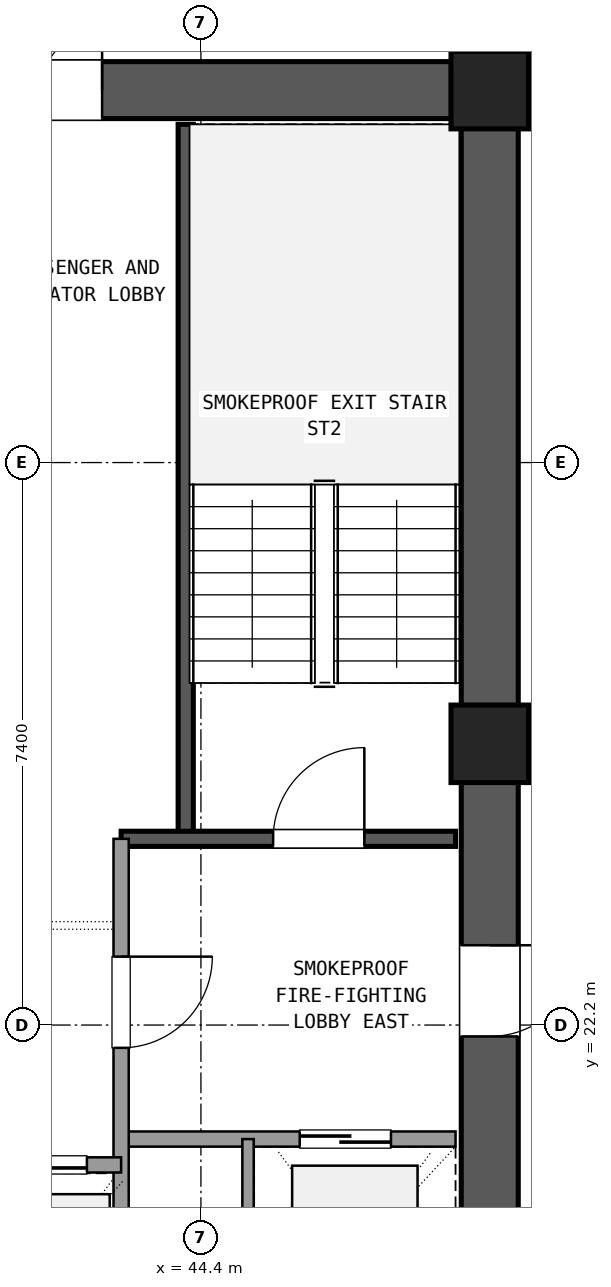
"""IFC4 building model, lengths in metres.
Left out: names, types, materials, properties, quantities, classifications, styles, units other than length and angle.
Written with IfcOpenShell. Run it as: python <this file> out.ifc"""

import sys

from ifc_helpers import new_model, si_unit, direction, frame, frame_2d, origin, origin_2d, place, context, subcontext, project, spatial, rectangle, extrude, element, fill, save


model = new_model("IFC4")
c1 = context("Model", 3, precision=1e-05, world=origin(), true_north=direction((0.0, 1.0)))
c2 = subcontext(c1, "Body", "Model", "MODEL_VIEW")
j1 = project(units=[si_unit("LENGTHUNIT", "METRE"), si_unit("PLANEANGLEUNIT", "RADIAN")], contexts=[c1])
p1 = place(None, origin())
s1 = spatial("IfcSite", under=j1, at=p1, CompositionType="ELEMENT")
p2 = place(p1, origin())
s2 = spatial("IfcBuilding", under=s1, at=p2, CompositionType="ELEMENT")
p3 = place(p2, frame((0.0, 0.0, 99.18)))
s3 = spatial("IfcBuildingStorey", under=s2, at=p3, CompositionType="ELEMENT", Elevation=99.18)
for number, where, z_axis, x_axis in (
    (1, (48.2, 25.9, 0.0), (0.0, 0.0, 1.0), (1.0, 0.0, 0.0)),
    (2, (48.2, 34.5, 0.0), (0.0, 0.0, 1.0), (1.0, 0.0, 0.0)),
):
    element("IfcColumn", number, at=place(p3, frame(where, z_axis=z_axis, x_axis=x_axis)), inside=s3, PredefinedType="COLUMN", context=c2, shape_type="SweptSolid", body=[
        extrude(rectangle(XDim=1.02, YDim=1.02, at=origin_2d()), origin(), (0.0, 0.0, 1.0), 3.6),
    ])
p4 = place(p3, frame((48.2, 17.805, 0.0), z_axis=(0.0, 0.0, 1.0), x_axis=(0.0, 1.0, 0.0)))
e3 = element("IfcWall", 3, at=p4, inside=s3, PredefinedType="SHEAR", context=c2, shape_type="SweptSolid", body=[
    extrude(rectangle(XDim=7.59, YDim=0.75, at=frame_2d((3.795, 0.0))), origin(), (0.0, 0.0, 1.0), 3.32),
])
p5 = place(p4, frame((4.245, 0.0, 0.0)))
e4 = element("IfcOpeningElement", 4, at=p5, cuts=e3, PredefinedType="OPENING", context=c2, shape_type="SweptSolid", body=[
    extrude(rectangle(XDim=1.2, YDim=2.15, at=frame_2d((0.6, 1.075))), frame((0.0, 0.385, 0.0), z_axis=(0.0, -1.0, 0.0), x_axis=(1.0, 0.0, 0.0)), (0.0, 0.0, 1.0), 0.77),
])
p6 = place(p3, frame((48.2, 26.405, 0.0), z_axis=(0.0, 0.0, 1.0), x_axis=(0.0, 1.0, 0.0)))
e5 = element("IfcWall", 5, at=p6, inside=s3, PredefinedType="SHEAR", context=c2, shape_type="SweptSolid", body=[
    extrude(rectangle(XDim=7.59, YDim=0.75, at=frame_2d((3.795, 0.0))), origin(), (0.0, 0.0, 1.0), 3.32),
])
p7 = place(p3, frame((47.695, 34.5, 0.0), z_axis=(0.0, 0.0, 1.0), x_axis=(-1.0, 0.0, 0.0)))
e6 = element("IfcWall", 6, at=p7, inside=s3, PredefinedType="SHEAR", context=c2, shape_type="SweptSolid", body=[
    extrude(rectangle(XDim=10.19, YDim=0.75, at=frame_2d((5.095, 0.0))), origin(), (0.0, 0.0, 1.0), 3.32),
])
p8 = place(p7, frame((4.595, 0.0, 0.0)))
e7 = element("IfcOpeningElement", 7, at=p8, cuts=e6, PredefinedType="OPENING", context=c2, shape_type="SweptSolid", body=[
    extrude(rectangle(XDim=1.6, YDim=2.2, at=frame_2d((0.8, 1.1))), frame((0.0, 0.385, 0.0), z_axis=(0.0, -1.0, 0.0), x_axis=(1.0, 0.0, 0.0)), (0.0, 0.0, 1.0), 0.77),
])
p9 = place(p3, frame((44.2, 24.65, 0.0), z_axis=(0.0, 0.0, 1.0), x_axis=(0.0, 1.0, 0.0)))
e8 = element("IfcWall", 8, at=p9, inside=s3, PredefinedType="SHEAR", context=c2, shape_type="SweptSolid", body=[
    extrude(rectangle(XDim=9.4, YDim=0.2, at=frame_2d((4.7, 0.0))), origin(), (0.0, 0.0, 1.0), 3.32),
])
p10 = place(p3, frame((43.35, 24.65, 0.0), z_axis=(0.0, 0.0, 1.0), x_axis=(1.0, 0.0, 0.0)))
e9 = element("IfcWall", 9, at=p10, inside=s3, PredefinedType="SHEAR", context=c2, shape_type="SweptSolid", body=[
    extrude(rectangle(XDim=4.4, YDim=0.2, at=frame_2d((2.2, 0.0))), origin(), (0.0, 0.0, 1.0), 3.32),
])
p11 = place(p10, frame((2.0, 0.0, 0.0)))
e10 = element("IfcOpeningElement", 10, at=p11, cuts=e9, PredefinedType="OPENING", context=c2, shape_type="SweptSolid", body=[
    extrude(rectangle(XDim=1.2, YDim=2.15, at=frame_2d((0.6, 1.075))), frame((0.0, 0.11, 0.0), z_axis=(0.0, -1.0, 0.0), x_axis=(1.0, 0.0, 0.0)), (0.0, 0.0, 1.0), 0.22),
])
p12 = place(p3, frame((43.35, 20.7, 0.0), z_axis=(0.0, 0.0, 1.0), x_axis=(1.0, 0.0, 0.0)))
e11 = element("IfcWall", 11, at=p12, inside=s3, PredefinedType="SOLIDWALL", context=c2, shape_type="SweptSolid", body=[
    extrude(rectangle(XDim=4.4, YDim=0.2, at=frame_2d((2.2, 0.0))), origin(), (0.0, 0.0, 1.0), 2.61),
])
p13 = place(p12, frame((2.35, 0.0, 0.0)))
e12 = element("IfcOpeningElement", 12, at=p13, cuts=e11, PredefinedType="OPENING", context=c2, shape_type="SweptSolid", body=[
    extrude(rectangle(XDim=1.2, YDim=2.15, at=frame_2d((0.6, 1.075))), frame((0.0, 0.11, 0.0), z_axis=(0.0, -1.0, 0.0), x_axis=(1.0, 0.0, 0.0)), (0.0, 0.0, 1.0), 0.22),
])
p14 = place(p3, frame((43.35, 17.75, 0.0), z_axis=(0.0, 0.0, 1.0), x_axis=(0.0, 1.0, 0.0)))
e13 = element("IfcWall", 13, at=p14, inside=s3, PredefinedType="SOLIDWALL", context=c2, shape_type="SweptSolid", body=[
    extrude(rectangle(XDim=6.9, YDim=0.2, at=frame_2d((3.45, 0.0))), origin(), (0.0, 0.0, 1.0), 2.61),
])
p15 = place(p14, frame((4.15, 0.0, 0.0)))
e14 = element("IfcOpeningElement", 14, at=p15, cuts=e13, PredefinedType="OPENING", context=c2, shape_type="SweptSolid", body=[
    extrude(rectangle(XDim=1.2, YDim=2.15, at=frame_2d((0.6, 1.075))), frame((0.0, 0.11, 0.0), z_axis=(0.0, -1.0, 0.0), x_axis=(1.0, 0.0, 0.0)), (0.0, 0.0, 1.0), 0.22),
])
p16 = place(p3, frame((45.02, 17.75, 0.0), z_axis=(0.0, 0.0, 1.0), x_axis=(0.0, 1.0, 0.0)))
e15 = element("IfcWall", 15, at=p16, inside=s3, PredefinedType="PARTITIONING", context=c2, shape_type="SweptSolid", body=[
    extrude(rectangle(XDim=2.95, YDim=0.15, at=frame_2d((1.475, 0.0))), origin(), (0.0, 0.0, 1.0), 2.61),
])
p17 = place(p3, frame((37.25, 20.36, 0.0), z_axis=(0.0, 0.0, 1.0), x_axis=(1.0, 0.0, 0.0)))
e16 = element("IfcWall", 16, at=p17, inside=s3, PredefinedType="SOLIDWALL", context=c2, shape_type="SweptSolid", body=[
    extrude(rectangle(XDim=6.1, YDim=0.2, at=frame_2d((3.05, 0.0))), origin(), (0.0, 0.0, 1.0), 2.61),
])
p18 = place(p17, frame((0.45, 0.0, 0.0)))
e17 = element("IfcOpeningElement", 17, at=p18, cuts=e16, PredefinedType="OPENING", context=c2, shape_type="SweptSolid", body=[
    extrude(rectangle(XDim=1.1, YDim=2.15, at=frame_2d((0.55, 1.075))), frame((0.0, 0.11, 0.0), z_axis=(0.0, -1.0, 0.0), x_axis=(1.0, 0.0, 0.0)), (0.0, 0.0, 1.0), 0.22),
])
p19 = place(p17, frame((2.5, 0.0, 0.0)))
e18 = element("IfcOpeningElement", 18, at=p19, cuts=e16, PredefinedType="OPENING", context=c2, shape_type="SweptSolid", body=[
    extrude(rectangle(XDim=1.1, YDim=2.15, at=frame_2d((0.55, 1.075))), frame((0.0, 0.11, 0.0), z_axis=(0.0, -1.0, 0.0), x_axis=(1.0, 0.0, 0.0)), (0.0, 0.0, 1.0), 0.22),
])
p20 = place(p17, frame((4.55, 0.0, 0.0)))
e19 = element("IfcOpeningElement", 19, at=p20, cuts=e16, PredefinedType="OPENING", context=c2, shape_type="SweptSolid", body=[
    extrude(rectangle(XDim=1.1, YDim=2.15, at=frame_2d((0.55, 1.075))), frame((0.0, 0.11, 0.0), z_axis=(0.0, -1.0, 0.0), x_axis=(1.0, 0.0, 0.0)), (0.0, 0.0, 1.0), 0.22),
])
p21 = place(p11, origin())
e20 = element("IfcDoor", 20, at=p21, inside=s3, OperationType="SINGLE_SWING_RIGHT", PredefinedType="DOOR", context=c2, shape_type="SweptSolid", body=[
    extrude(rectangle(XDim=1.2, YDim=2.15, at=frame_2d((0.6, 1.075))), frame((0.0, 0.025, 0.0), z_axis=(0.0, -1.0, 0.0), x_axis=(1.0, 0.0, 0.0)), (0.0, 0.0, 1.0), 0.05),
])
fill(e10, e20)
p22 = place(p13, origin())
e21 = element("IfcDoor", 21, at=p22, inside=s3, OperationType="SLIDING_TO_RIGHT", PredefinedType="DOOR", context=c2, shape_type="SweptSolid", body=[
    extrude(rectangle(XDim=1.2, YDim=2.15, at=frame_2d((0.6, 1.075))), frame((0.0, 0.025, 0.0), z_axis=(0.0, -1.0, 0.0), x_axis=(1.0, 0.0, 0.0)), (0.0, 0.0, 1.0), 0.05),
])
fill(e12, e21)
p23 = place(p15, frame((1.2, 0.0, 0.0), z_axis=(0.0, 0.0, 1.0), x_axis=(-1.0, 0.0, 0.0)))
e22 = element("IfcDoor", 22, at=p23, inside=s3, OperationType="SINGLE_SWING_RIGHT", PredefinedType="DOOR", context=c2, shape_type="SweptSolid", body=[
    extrude(rectangle(XDim=1.2, YDim=2.15, at=frame_2d((0.6, 1.075))), frame((0.0, 0.025, 0.0), z_axis=(0.0, -1.0, 0.0), x_axis=(1.0, 0.0, 0.0)), (0.0, 0.0, 1.0), 0.05),
])
fill(e14, e22)
p24 = place(p5, frame((1.2, 0.0, 0.0), z_axis=(0.0, 0.0, 1.0), x_axis=(-1.0, 0.0, 0.0)))
e23 = element("IfcDoor", 23, at=p24, inside=s3, OperationType="SINGLE_SWING_RIGHT", PredefinedType="DOOR", context=c2, shape_type="SweptSolid", body=[
    extrude(rectangle(XDim=1.2, YDim=2.15, at=frame_2d((0.6, 1.075))), frame((0.0, 0.025, 0.0), z_axis=(0.0, -1.0, 0.0), x_axis=(1.0, 0.0, 0.0)), (0.0, 0.0, 1.0), 0.05),
])
fill(e4, e23)
p25 = place(p8, frame((1.6, 0.0, 0.0), z_axis=(0.0, 0.0, 1.0), x_axis=(-1.0, 0.0, 0.0)))
e24 = element("IfcDoor", 24, at=p25, inside=s3, OperationType="DOUBLE_DOOR_SINGLE_SWING", PredefinedType="DOOR", context=c2, shape_type="SweptSolid", body=[
    extrude(rectangle(XDim=1.6, YDim=2.2, at=frame_2d((0.8, 1.1))), frame((0.0, 0.025, 0.0), z_axis=(0.0, -1.0, 0.0), x_axis=(1.0, 0.0, 0.0)), (0.0, 0.0, 1.0), 0.05),
])
fill(e7, e24)
p26 = place(p20, origin())
e25 = element("IfcDoor", 25, at=p26, inside=s3, OperationType="SLIDING_TO_LEFT", PredefinedType="DOOR", context=c2, shape_type="SweptSolid", body=[
    extrude(rectangle(XDim=1.1, YDim=2.15, at=frame_2d((0.55, 1.075))), frame((0.0, 0.025, 0.0), z_axis=(0.0, -1.0, 0.0), x_axis=(1.0, 0.0, 0.0)), (0.0, 0.0, 1.0), 0.05),
])
fill(e19, e25)
save(model, sys.argv[1])
